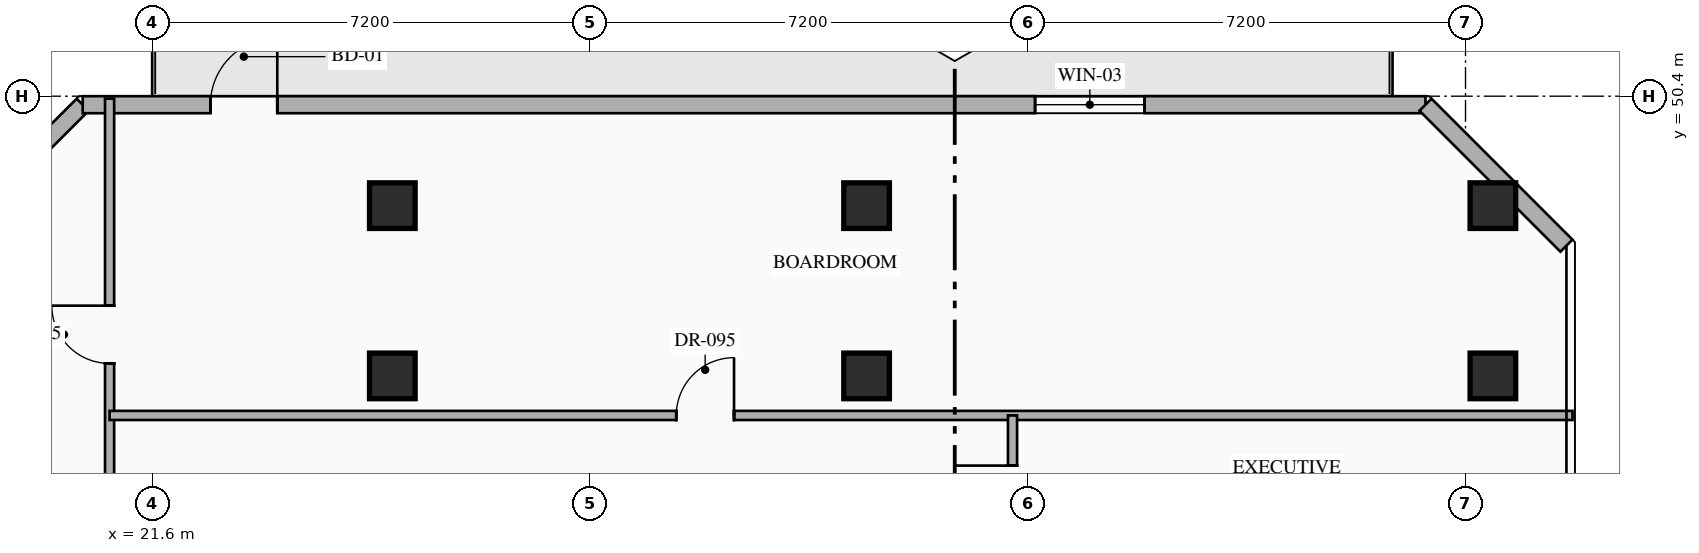
"""IFC4 building model, lengths in metres.
Left out: names, types, materials, properties, quantities, classifications, styles, units other than length and angle.
Written with IfcOpenShell. Run it as: python <this file> out.ifc"""

import sys

from ifc_helpers import new_model, si_unit, direction, frame, frame_2d, origin, origin_2d, place, context, subcontext, project, spatial, rectangle, hollow_rectangle, extrude, element, fill, save


model = new_model("IFC4")
c1 = context("Model", 3, precision=1e-05, world=origin(), true_north=direction((0.0, 1.0)))
c2 = subcontext(c1, "Body", "Model", "MODEL_VIEW")
j1 = project(units=[si_unit("LENGTHUNIT", "METRE"), si_unit("PLANEANGLEUNIT", "RADIAN")], contexts=[c1])
p1 = place(None, origin())
s1 = spatial("IfcSite", under=j1, at=p1, CompositionType="ELEMENT")
p2 = place(p1, origin())
s2 = spatial("IfcBuilding", under=s1, at=p2, CompositionType="ELEMENT")
p3 = place(p2, frame((0.0, 0.0, 213.15)))
s3 = spatial("IfcBuildingStorey", under=s2, at=p3, CompositionType="ELEMENT", Elevation=213.15)
for number, where, z_axis, x_axis in (
    (1, (25.55, 45.8, 0.0), (0.0, 0.0, 1.0), (1.0, 0.0, 0.0)),
    (2, (33.35, 45.8, 0.0), (0.0, 0.0, 1.0), (1.0, 0.0, 0.0)),
    (3, (43.65, 45.8, 0.0), (0.0, 0.0, 1.0), (1.0, 0.0, 0.0)),
    (4, (25.55, 48.6, 0.0), (0.0, 0.0, 1.0), (1.0, 0.0, 0.0)),
    (5, (33.35, 48.6, 0.0), (0.0, 0.0, 1.0), (1.0, 0.0, 0.0)),
    (6, (43.65, 48.6, 0.0), (0.0, 0.0, 1.0), (1.0, 0.0, 0.0)),
):
    element("IfcColumn", number, at=place(p3, frame(where, z_axis=z_axis, x_axis=x_axis)), inside=s3, PredefinedType="COLUMN", context=c2, shape_type="SweptSolid", body=[
        extrude(hollow_rectangle(XDim=0.75, YDim=0.75, WallThickness=0.028, at=origin_2d()), origin(), (0.0, 0.0, 1.0), 3.6),
    ])
p4 = place(p3, frame((18.14, 47.942, 0.0), z_axis=(0.0, 0.0, 1.0), x_axis=(0.707106781187, 0.707106781187, 0.0)))
e7 = element("IfcWall", 7, at=p4, inside=s3, PredefinedType="STANDARD", context=c2, shape_type="SweptSolid", body=[
    extrude(rectangle(XDim=3.278, YDim=0.28, at=frame_2d((1.639, 0.0))), origin(), (0.0, 0.0, 1.0), 3.35),
])
p5 = place(p3, frame((20.458, 50.26, 0.0), z_axis=(0.0, 0.0, 1.0), x_axis=(1.0, 0.0, 0.0)))
e8 = element("IfcWall", 8, at=p5, inside=s3, PredefinedType="STANDARD", context=c2, shape_type="SweptSolid", body=[
    extrude(rectangle(XDim=22.084, YDim=0.28, at=frame_2d((11.042, 0.0))), origin(), (0.0, 0.0, 1.0), 3.35),
])
p6 = place(p5, frame((2.1, 0.0, 0.0)))
e9 = element("IfcOpeningElement", 9, at=p6, cuts=e8, PredefinedType="OPENING", context=c2, shape_type="SweptSolid", body=[
    extrude(rectangle(XDim=1.1, YDim=2.2, at=frame_2d((0.55, 1.1))), frame((0.0, 0.15, 0.0), z_axis=(0.0, -1.0, 0.0), x_axis=(1.0, 0.0, 0.0)), (0.0, 0.0, 1.0), 0.3),
])
p7 = place(p5, frame((15.663, 0.0, 0.85)))
e10 = element("IfcOpeningElement", 10, at=p7, cuts=e8, PredefinedType="OPENING", context=c2, shape_type="SweptSolid", body=[
    extrude(rectangle(XDim=1.8, YDim=2.1, at=frame_2d((0.9, 1.05))), frame((0.0, 0.15, 0.0), z_axis=(0.0, -1.0, 0.0), x_axis=(1.0, 0.0, 0.0)), (0.0, 0.0, 1.0), 0.3),
])
p8 = place(p3, frame((42.542, 50.26, 0.0), z_axis=(0.0, 0.0, 1.0), x_axis=(0.707106781187, -0.707106781187, 0.0)))
e11 = element("IfcWall", 11, at=p8, inside=s3, PredefinedType="STANDARD", context=c2, shape_type="SweptSolid", body=[
    extrude(rectangle(XDim=3.278, YDim=0.28, at=frame_2d((1.639, 0.0))), origin(), (0.0, 0.0, 1.0), 3.35),
])
p9 = place(p3, frame((20.9, 42.6, 0.0), z_axis=(0.0, 0.0, 1.0), x_axis=(0.0, 1.0, 0.0)))
e12 = element("IfcWall", 12, at=p9, inside=s3, PredefinedType="PARTITIONING", context=c2, shape_type="SweptSolid", body=[
    extrude(rectangle(XDim=7.76, YDim=0.15, at=frame_2d((3.88, 0.0))), origin(), (0.0, 0.0, 1.0), 3.35),
])
p10 = place(p9, frame((3.405, 0.0, 0.0)))
e13 = element("IfcOpeningElement", 13, at=p10, cuts=e12, PredefinedType="OPENING", context=c2, shape_type="SweptSolid", body=[
    extrude(rectangle(XDim=0.95, YDim=2.15, at=frame_2d((0.475, 1.075))), frame((0.0, 0.085, 0.0), z_axis=(0.0, -1.0, 0.0), x_axis=(1.0, 0.0, 0.0)), (0.0, 0.0, 1.0), 0.17),
])
p11 = place(p3, frame((20.9, 45.15, 0.0), z_axis=(0.0, 0.0, 1.0), x_axis=(1.0, 0.0, 0.0)))
e14 = element("IfcWall", 14, at=p11, inside=s3, PredefinedType="PARTITIONING", context=c2, shape_type="SweptSolid", body=[
    extrude(rectangle(XDim=24.06, YDim=0.15, at=frame_2d((12.03, 0.0))), origin(), (0.0, 0.0, 1.0), 3.35),
])
p12 = place(p11, frame((9.32, 0.0, 0.0)))
e15 = element("IfcOpeningElement", 15, at=p12, cuts=e14, PredefinedType="OPENING", context=c2, shape_type="SweptSolid", body=[
    extrude(rectangle(XDim=0.95, YDim=2.15, at=frame_2d((0.475, 1.075))), frame((0.0, 0.085, 0.0), z_axis=(0.0, -1.0, 0.0), x_axis=(1.0, 0.0, 0.0)), (0.0, 0.0, 1.0), 0.17),
])
p13 = place(p3, frame((35.75, 42.55, 0.0), z_axis=(0.0, 0.0, 1.0), x_axis=(0.0, 1.0, 0.0)))
e16 = element("IfcWall", 16, at=p13, inside=s3, PredefinedType="PARTITIONING", context=c2, shape_type="SweptSolid", body=[
    extrude(rectangle(XDim=2.6, YDim=0.15, at=frame_2d((1.3, 0.0))), origin(), (0.0, 0.0, 1.0), 3.35),
])
p14 = place(p13, frame((0.825, 0.0, 0.0)))
e17 = element("IfcOpeningElement", 17, at=p14, cuts=e16, PredefinedType="OPENING", context=c2, shape_type="SweptSolid", body=[
    extrude(rectangle(XDim=0.95, YDim=2.15, at=frame_2d((0.475, 1.075))), frame((0.0, 0.085, 0.0), z_axis=(0.0, -1.0, 0.0), x_axis=(1.0, 0.0, 0.0)), (0.0, 0.0, 1.0), 0.17),
])
p15 = place(p6, origin())
e18 = element("IfcDoor", 18, at=p15, inside=s3, OperationType="SINGLE_SWING_RIGHT", PredefinedType="DOOR", context=c2, shape_type="SweptSolid", body=[
    extrude(rectangle(XDim=1.1, YDim=2.2, at=frame_2d((0.55, 1.1))), frame((0.0, 0.025, 0.0), z_axis=(0.0, -1.0, 0.0), x_axis=(1.0, 0.0, 0.0)), (0.0, 0.0, 1.0), 0.05),
])
fill(e9, e18)
p16 = place(p7, origin())
e19 = element("IfcWindow", 19, at=p16, inside=s3, PartitioningType="SINGLE_PANEL", PredefinedType="WINDOW", context=c2, shape_type="SweptSolid", body=[
    extrude(rectangle(XDim=1.8, YDim=2.1, at=frame_2d((0.9, 1.05))), frame((0.0, 0.03, 0.0), z_axis=(0.0, -1.0, 0.0), x_axis=(1.0, 0.0, 0.0)), (0.0, 0.0, 1.0), 0.06),
])
fill(e10, e19)
p17 = place(p10, origin())
e20 = element("IfcDoor", 20, at=p17, inside=s3, OperationType="SINGLE_SWING_RIGHT", PredefinedType="DOOR", context=c2, shape_type="SweptSolid", body=[
    extrude(rectangle(XDim=0.95, YDim=2.15, at=frame_2d((0.475, 1.075))), frame((0.0, 0.025, 0.0), z_axis=(0.0, -1.0, 0.0), x_axis=(1.0, 0.0, 0.0)), (0.0, 0.0, 1.0), 0.05),
])
fill(e13, e20)
p18 = place(p12, origin())
e21 = element("IfcDoor", 21, at=p18, inside=s3, OperationType="SINGLE_SWING_RIGHT", PredefinedType="DOOR", context=c2, shape_type="SweptSolid", body=[
    extrude(rectangle(XDim=0.95, YDim=2.15, at=frame_2d((0.475, 1.075))), frame((0.0, 0.025, 0.0), z_axis=(0.0, -1.0, 0.0), x_axis=(1.0, 0.0, 0.0)), (0.0, 0.0, 1.0), 0.05),
])
fill(e15, e21)
p19 = place(p14, origin())
e22 = element("IfcDoor", 22, at=p19, inside=s3, OperationType="SINGLE_SWING_RIGHT", PredefinedType="DOOR", context=c2, shape_type="SweptSolid", body=[
    extrude(rectangle(XDim=0.95, YDim=2.15, at=frame_2d((0.475, 1.075))), frame((0.0, 0.025, 0.0), z_axis=(0.0, -1.0, 0.0), x_axis=(1.0, 0.0, 0.0)), (0.0, 0.0, 1.0), 0.05),
])
fill(e17, e22)
save(model, sys.argv[1])
